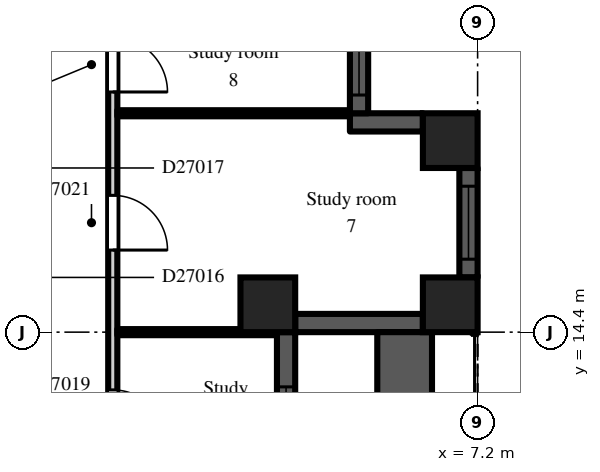
"""IFC4 building model, lengths in metres.
Left out: names, types, materials, properties, quantities, classifications, styles, units other than length and angle.
Written with IfcOpenShell. Run it as: python <this file> out.ifc"""

import sys

from ifc_helpers import new_model, si_unit, direction, frame, frame_2d, origin, origin_2d, place, context, subcontext, project, spatial, rectangle, extrude, element, fill, save


model = new_model("IFC4")
c1 = context("Model", 3, precision=1e-05, world=origin(), true_north=direction((0.0, 1.0)))
c2 = subcontext(c1, "Body", "Model", "MODEL_VIEW")
j1 = project(units=[si_unit("LENGTHUNIT", "METRE"), si_unit("PLANEANGLEUNIT", "RADIAN")], contexts=[c1])
p1 = place(None, origin())
s1 = spatial("IfcSite", under=j1, at=p1, CompositionType="ELEMENT")
p2 = place(p1, origin())
s2 = spatial("IfcBuilding", under=s1, at=p2, CompositionType="ELEMENT")
p3 = place(p2, frame((0.0, 0.0, 191.7)))
s3 = spatial("IfcBuildingStorey", under=s2, at=p3, CompositionType="ELEMENT", Elevation=191.7)
for number, where, z_axis, x_axis in (
    (1, (3.75, 14.85, 0.0), (0.0, 0.0, 1.0), (1.0, 0.0, 0.0)),
    (2, (6.75, 14.85, 0.0), (0.0, 0.0, 1.0), (1.0, 0.0, 0.0)),
    (3, (6.75, 17.55, 0.0), (0.0, 0.0, 1.0), (1.0, 0.0, 0.0)),
):
    element("IfcColumn", number, at=place(p3, frame(where, z_axis=z_axis, x_axis=x_axis)), inside=s3, PredefinedType="COLUMN", context=c2, shape_type="SweptSolid", body=[
        extrude(rectangle(XDim=0.9, YDim=0.9, at=origin_2d()), origin(), (0.0, 0.0, 1.0), 3.0),
    ])
p4 = place(p3, frame((4.05, 7.2, 0.0), z_axis=(0.0, 0.0, 1.0), x_axis=(0.0, 1.0, 0.0)))
e4 = element("IfcWall", 4, at=p4, inside=s3, PredefinedType="SOLIDWALL", context=c2, shape_type="SweptSolid", body=[
    extrude(rectangle(XDim=7.2, YDim=0.3, at=frame_2d((3.6, 0.0))), origin(), (0.0, 0.0, 1.0), 2.55),
])
p5 = place(p4, frame((3.0, 0.0, 0.0)))
e5 = element("IfcOpeningElement", 5, at=p5, cuts=e4, PredefinedType="OPENING", context=c2, shape_type="SweptSolid", body=[
    extrude(rectangle(XDim=1.2, YDim=2.05, at=frame_2d((0.6, 1.025))), frame((0.0, 0.16, 0.0), z_axis=(0.0, -1.0, 0.0), x_axis=(1.0, 0.0, 0.0)), (0.0, 0.0, 1.0), 0.32),
])
p6 = place(p4, frame((0.9, 0.0, 0.2)))
e6 = element("IfcOpeningElement", 6, at=p6, cuts=e4, PredefinedType="OPENING", context=c2, shape_type="SweptSolid", body=[
    extrude(rectangle(XDim=1.8, YDim=1.85, at=frame_2d((0.9, 0.925))), frame((0.0, 0.16, 0.0), z_axis=(0.0, -1.0, 0.0), x_axis=(1.0, 0.0, 0.0)), (0.0, 0.0, 1.0), 0.32),
])
p7 = place(p4, frame((4.5, 0.0, 0.2)))
e7 = element("IfcOpeningElement", 7, at=p7, cuts=e4, PredefinedType="OPENING", context=c2, shape_type="SweptSolid", body=[
    extrude(rectangle(XDim=1.8, YDim=1.85, at=frame_2d((0.9, 0.925))), frame((0.0, 0.16, 0.0), z_axis=(0.0, -1.0, 0.0), x_axis=(1.0, 0.0, 0.0)), (0.0, 0.0, 1.0), 0.32),
])
p8 = place(p3, frame((4.2, 14.55, 0.0), z_axis=(0.0, 0.0, 1.0), x_axis=(1.0, 0.0, 0.0)))
e8 = element("IfcWall", 8, at=p8, inside=s3, PredefinedType="SOLIDWALL", context=c2, shape_type="SweptSolid", body=[
    extrude(rectangle(XDim=2.1, YDim=0.3, at=frame_2d((1.05, 0.0))), origin(), (0.0, 0.0, 1.0), 2.55),
])
p9 = place(p3, frame((7.05, 15.3, 0.0), z_axis=(0.0, 0.0, 1.0), x_axis=(0.0, 1.0, 0.0)))
e9 = element("IfcWall", 9, at=p9, inside=s3, PredefinedType="SOLIDWALL", context=c2, shape_type="SweptSolid", body=[
    extrude(rectangle(XDim=1.8, YDim=0.3, at=frame_2d((0.9, 0.0))), origin(), (0.0, 0.0, 1.0), 2.3),
])
p10 = place(p9, frame((0.3, 0.0, 0.2)))
e10 = element("IfcOpeningElement", 10, at=p10, cuts=e9, PredefinedType="OPENING", context=c2, shape_type="SweptSolid", body=[
    extrude(rectangle(XDim=1.2, YDim=1.85, at=frame_2d((0.6, 0.925))), frame((0.0, 0.16, 0.0), z_axis=(0.0, -1.0, 0.0), x_axis=(1.0, 0.0, 0.0)), (0.0, 0.0, 1.0), 0.32),
])
p11 = place(p3, frame((6.3, 17.85, 0.0), z_axis=(0.0, 0.0, 1.0), x_axis=(-1.0, 0.0, 0.0)))
e11 = element("IfcWall", 11, at=p11, inside=s3, PredefinedType="SOLIDWALL", context=c2, shape_type="SweptSolid", body=[
    extrude(rectangle(XDim=1.2, YDim=0.3, at=frame_2d((0.6, 0.0))), origin(), (0.0, 0.0, 1.0), 2.55),
])
p12 = place(p3, frame((5.25, 18.0, 0.0), z_axis=(0.0, 0.0, 1.0), x_axis=(0.0, 1.0, 0.0)))
e12 = element("IfcWall", 12, at=p12, inside=s3, PredefinedType="SOLIDWALL", context=c2, shape_type="SweptSolid", body=[
    extrude(rectangle(XDim=1.8, YDim=0.3, at=frame_2d((0.9, 0.0))), origin(), (0.0, 0.0, 1.0), 2.55),
])
p13 = place(p12, frame((0.3, 0.0, 0.2)))
e13 = element("IfcOpeningElement", 13, at=p13, cuts=e12, PredefinedType="OPENING", context=c2, shape_type="SweptSolid", body=[
    extrude(rectangle(XDim=1.2, YDim=1.85, at=frame_2d((0.6, 0.925))), frame((0.0, 0.16, 0.0), z_axis=(0.0, -1.0, 0.0), x_axis=(1.0, 0.0, 0.0)), (0.0, 0.0, 1.0), 0.32),
])
p14 = place(p3, frame((6.0, 7.2, 0.0), z_axis=(0.0, 0.0, 1.0), x_axis=(0.0, 1.0, 0.0)))
e14 = element("IfcWall", 14, at=p14, inside=s3, PredefinedType="PARAPET", context=c2, shape_type="SweptSolid", body=[
    extrude(rectangle(XDim=7.2, YDim=0.9, at=frame_2d((3.6, 0.0))), origin(), (0.0, 0.0, 1.0), 0.8),
])
p15 = place(p3, frame((1.2, 1.125, 0.0), z_axis=(0.0, 0.0, 1.0), x_axis=(0.0, 1.0, 0.0)))
e15 = element("IfcWall", 15, at=p15, inside=s3, PredefinedType="PARTITIONING", context=c2, shape_type="SweptSolid", body=[
    extrude(rectangle(XDim=18.4, YDim=0.15, at=frame_2d((9.2, 0.0))), origin(), (0.0, 0.0, 1.0), 2.55),
])
p16 = place(p15, frame((3.825, 0.0, 0.0)))
e16 = element("IfcOpeningElement", 16, at=p16, cuts=e15, PredefinedType="OPENING", context=c2, shape_type="SweptSolid", body=[
    extrude(rectangle(XDim=0.9, YDim=2.1, at=frame_2d((0.45, 1.05))), frame((0.0, 0.085, 0.0), z_axis=(0.0, -1.0, 0.0), x_axis=(1.0, 0.0, 0.0)), (0.0, 0.0, 1.0), 0.17),
])
p17 = place(p15, frame((11.425, 0.0, 0.0)))
e17 = element("IfcOpeningElement", 17, at=p17, cuts=e15, PredefinedType="OPENING", context=c2, shape_type="SweptSolid", body=[
    extrude(rectangle(XDim=0.9, YDim=2.1, at=frame_2d((0.45, 1.05))), frame((0.0, 0.085, 0.0), z_axis=(0.0, -1.0, 0.0), x_axis=(1.0, 0.0, 0.0)), (0.0, 0.0, 1.0), 0.17),
])
p18 = place(p15, frame((7.825, 0.0, 0.0)))
e18 = element("IfcOpeningElement", 18, at=p18, cuts=e15, PredefinedType="OPENING", context=c2, shape_type="SweptSolid", body=[
    extrude(rectangle(XDim=0.9, YDim=2.1, at=frame_2d((0.45, 1.05))), frame((0.0, 0.085, 0.0), z_axis=(0.0, -1.0, 0.0), x_axis=(1.0, 0.0, 0.0)), (0.0, 0.0, 1.0), 0.17),
])
p19 = place(p15, frame((14.625, 0.0, 0.0)))
e19 = element("IfcOpeningElement", 19, at=p19, cuts=e15, PredefinedType="OPENING", context=c2, shape_type="SweptSolid", body=[
    extrude(rectangle(XDim=0.9, YDim=2.1, at=frame_2d((0.45, 1.05))), frame((0.0, 0.085, 0.0), z_axis=(0.0, -1.0, 0.0), x_axis=(1.0, 0.0, 0.0)), (0.0, 0.0, 1.0), 0.17),
])
p20 = place(p15, frame((17.225, 0.0, 0.0)))
e20 = element("IfcOpeningElement", 20, at=p20, cuts=e15, PredefinedType="OPENING", context=c2, shape_type="SweptSolid", body=[
    extrude(rectangle(XDim=0.9, YDim=2.1, at=frame_2d((0.45, 1.05))), frame((0.0, 0.085, 0.0), z_axis=(0.0, -1.0, 0.0), x_axis=(1.0, 0.0, 0.0)), (0.0, 0.0, 1.0), 0.17),
])
p21 = place(p3, frame((1.275, 14.4, 0.0), z_axis=(0.0, 0.0, 1.0), x_axis=(1.0, 0.0, 0.0)))
e21 = element("IfcWall", 21, at=p21, inside=s3, PredefinedType="PARTITIONING", context=c2, shape_type="SweptSolid", body=[
    extrude(rectangle(XDim=2.625, YDim=0.1, at=frame_2d((1.312, 0.0))), origin(), (0.0, 0.0, 1.0), 2.55),
])
p22 = place(p3, frame((1.275, 18.0, 0.0), z_axis=(0.0, 0.0, 1.0), x_axis=(1.0, 0.0, 0.0)))
e22 = element("IfcWall", 22, at=p22, inside=s3, PredefinedType="PARTITIONING", context=c2, shape_type="SweptSolid", body=[
    extrude(rectangle(XDim=3.825, YDim=0.1, at=frame_2d((1.913, 0.0))), origin(), (0.0, 0.0, 1.0), 2.55),
])
p23 = place(p7, origin())
e23 = element("IfcWindow", 23, at=p23, inside=s3, PartitioningType="SINGLE_PANEL", PredefinedType="WINDOW", context=c2, shape_type="SweptSolid", body=[
    extrude(rectangle(XDim=1.8, YDim=1.85, at=frame_2d((0.9, 0.925))), frame((0.0, 0.03, 0.0), z_axis=(0.0, -1.0, 0.0), x_axis=(1.0, 0.0, 0.0)), (0.0, 0.0, 1.0), 0.06),
])
fill(e7, e23)
p24 = place(p10, origin())
e24 = element("IfcWindow", 24, at=p24, inside=s3, PartitioningType="SINGLE_PANEL", PredefinedType="WINDOW", context=c2, shape_type="SweptSolid", body=[
    extrude(rectangle(XDim=1.2, YDim=1.85, at=frame_2d((0.6, 0.925))), frame((0.0, 0.03, 0.0), z_axis=(0.0, -1.0, 0.0), x_axis=(1.0, 0.0, 0.0)), (0.0, 0.0, 1.0), 0.06),
])
fill(e10, e24)
p25 = place(p13, origin())
e25 = element("IfcWindow", 25, at=p25, inside=s3, PartitioningType="SINGLE_PANEL", PredefinedType="WINDOW", context=c2, shape_type="SweptSolid", body=[
    extrude(rectangle(XDim=1.2, YDim=1.85, at=frame_2d((0.6, 0.925))), frame((0.0, 0.03, 0.0), z_axis=(0.0, -1.0, 0.0), x_axis=(1.0, 0.0, 0.0)), (0.0, 0.0, 1.0), 0.06),
])
fill(e13, e25)
p26 = place(p17, frame((0.9, 0.0, 0.0), z_axis=(0.0, 0.0, 1.0), x_axis=(-1.0, 0.0, 0.0)))
e26 = element("IfcDoor", 26, at=p26, inside=s3, OperationType="SINGLE_SWING_RIGHT", PredefinedType="DOOR", context=c2, shape_type="SweptSolid", body=[
    extrude(rectangle(XDim=0.9, YDim=2.1, at=frame_2d((0.45, 1.05))), frame((0.0, 0.025, 0.0), z_axis=(0.0, -1.0, 0.0), x_axis=(1.0, 0.0, 0.0)), (0.0, 0.0, 1.0), 0.05),
])
fill(e17, e26)
p27 = place(p19, frame((0.9, 0.0, 0.0), z_axis=(0.0, 0.0, 1.0), x_axis=(-1.0, 0.0, 0.0)))
e27 = element("IfcDoor", 27, at=p27, inside=s3, OperationType="SINGLE_SWING_RIGHT", PredefinedType="DOOR", context=c2, shape_type="SweptSolid", body=[
    extrude(rectangle(XDim=0.9, YDim=2.1, at=frame_2d((0.45, 1.05))), frame((0.0, 0.025, 0.0), z_axis=(0.0, -1.0, 0.0), x_axis=(1.0, 0.0, 0.0)), (0.0, 0.0, 1.0), 0.05),
])
fill(e19, e27)
p28 = place(p20, frame((0.9, 0.0, 0.0), z_axis=(0.0, 0.0, 1.0), x_axis=(-1.0, 0.0, 0.0)))
e28 = element("IfcDoor", 28, at=p28, inside=s3, OperationType="SINGLE_SWING_RIGHT", PredefinedType="DOOR", context=c2, shape_type="SweptSolid", body=[
    extrude(rectangle(XDim=0.9, YDim=2.1, at=frame_2d((0.45, 1.05))), frame((0.0, 0.025, 0.0), z_axis=(0.0, -1.0, 0.0), x_axis=(1.0, 0.0, 0.0)), (0.0, 0.0, 1.0), 0.05),
])
fill(e20, e28)
save(model, sys.argv[1])
